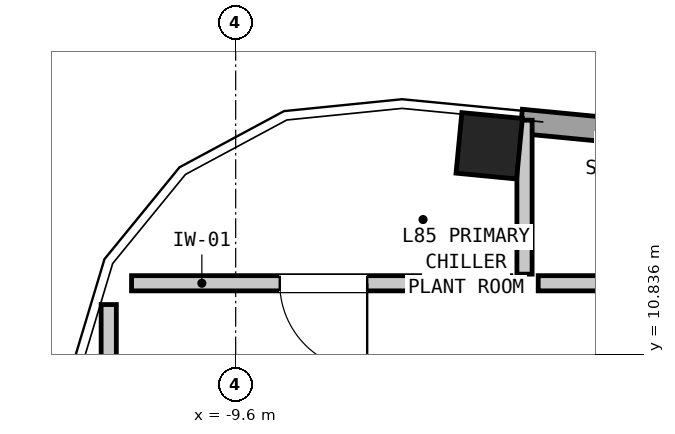
"""IFC4 building model, lengths in metres.
Left out: names, types, materials, properties, quantities, classifications, styles, units other than length and angle.
Written with IfcOpenShell. Run it as: python <this file> out.ifc"""

import sys

from ifc_helpers import new_model, si_unit, direction, frame, frame_2d, origin, origin_2d, place, context, subcontext, project, spatial, rectangle, extrude, element, fill, save


model = new_model("IFC4")
c1 = context("Model", 3, precision=1e-05, world=origin(), true_north=direction((0.0, 1.0)))
c2 = subcontext(c1, "Body", "Model", "MODEL_VIEW")
j1 = project(units=[si_unit("LENGTHUNIT", "METRE"), si_unit("PLANEANGLEUNIT", "RADIAN")], contexts=[c1])
p1 = place(None, origin())
s1 = spatial("IfcSite", under=j1, at=p1, CompositionType="ELEMENT")
p2 = place(p1, origin())
s2 = spatial("IfcBuilding", under=s1, at=p2, CompositionType="ELEMENT")
p3 = place(p2, frame((0.0, 0.0, 289.25)))
s3 = spatial("IfcBuildingStorey", under=s2, at=p3, CompositionType="ELEMENT", Elevation=289.25)
p4 = place(p3, frame((-6.264, 13.579, 0.0), z_axis=(0.0, 0.0, 1.0), x_axis=(0.995396198367, -0.09584575252, 0.0)))
e1 = element("IfcColumn", 1, at=p4, inside=s3, PredefinedType="COLUMN", context=c2, shape_type="SweptSolid", body=[
    extrude(rectangle(XDim=0.8, YDim=0.8, at=origin_2d()), origin(), (0.0, 0.0, 1.0), 3.6),
])
p5 = place(p3, frame((-5.844, 13.9, 0.0), z_axis=(0.0, 0.0, 1.0), x_axis=(0.995396489284, -0.095842731181, 0.0)))
e2 = element("IfcWall", 2, at=p5, inside=s3, PredefinedType="SOLIDWALL", context=c2, shape_type="SweptSolid", body=[
    extrude(rectangle(XDim=22.024, YDim=0.32, at=frame_2d((11.012, 0.0))), origin(), (0.0, 0.0, 1.0), 2.182),
])
p6 = place(p3, frame((-5.98, 11.77, 0.0), z_axis=(0.0, 0.0, 1.0), x_axis=(-1.0, 0.0, 0.0)))
e3 = element("IfcWall", 3, at=p6, inside=s3, PredefinedType="PARTITIONING", context=c2, shape_type="SweptSolid", body=[
    extrude(rectangle(XDim=4.99, YDim=0.2, at=frame_2d((2.495, 0.0))), origin(), (0.0, 0.0, 1.0), 3.32),
])
p7 = place(p6, frame((1.89, 0.0, 0.0)))
e4 = element("IfcOpeningElement", 4, at=p7, cuts=e3, PredefinedType="OPENING", context=c2, shape_type="SweptSolid", body=[
    extrude(rectangle(XDim=1.15, YDim=2.1, at=frame_2d((0.575, 1.05))), frame((0.0, 0.112, 0.0), z_axis=(0.0, -1.0, 0.0), x_axis=(1.0, 0.0, 0.0)), (0.0, 0.0, 1.0), 0.224),
])
p8 = place(p3, frame((-5.8, 11.89, 0.0), z_axis=(0.0, 0.0, 1.0), x_axis=(0.0, 1.0, 0.0)))
e5 = element("IfcWall", 5, at=p8, inside=s3, PredefinedType="PARTITIONING", context=c2, shape_type="SweptSolid", body=[
    extrude(rectangle(XDim=2.026, YDim=0.2, at=frame_2d((1.013, 0.0))), origin(), (0.0, 0.0, 1.0), 2.538),
])
p9 = place(p3, frame((-0.53, 11.77, 0.0), z_axis=(0.0, 0.0, 1.0), x_axis=(-1.0, 0.0, 0.0)))
e6 = element("IfcWall", 6, at=p9, inside=s3, PredefinedType="PARTITIONING", context=c2, shape_type="SweptSolid", body=[
    extrude(rectangle(XDim=5.09, YDim=0.2, at=frame_2d((2.545, 0.0))), origin(), (0.0, 0.0, 1.0), 3.32),
])
p10 = place(p9, frame((1.97, 0.0, 0.0)))
e7 = element("IfcOpeningElement", 7, at=p10, cuts=e6, PredefinedType="OPENING", context=c2, shape_type="SweptSolid", body=[
    extrude(rectangle(XDim=1.15, YDim=2.1, at=frame_2d((0.575, 1.05))), frame((0.0, 0.112, 0.0), z_axis=(0.0, -1.0, 0.0), x_axis=(1.0, 0.0, 0.0)), (0.0, 0.0, 1.0), 0.224),
])
p11 = place(p3, frame((-11.27, 11.49, 0.0), z_axis=(0.0, 0.0, 1.0), x_axis=(0.0, -1.0, 0.0)))
e8 = element("IfcWall", 8, at=p11, inside=s3, PredefinedType="PARTITIONING", context=c2, shape_type="SweptSolid", body=[
    extrude(rectangle(XDim=10.68, YDim=0.2, at=frame_2d((5.34, 0.0))), origin(), (0.0, 0.0, 1.0), 2.182),
])
p12 = place(p11, frame((4.765, 0.0, 0.0)))
e9 = element("IfcOpeningElement", 9, at=p12, cuts=e8, PredefinedType="OPENING", context=c2, shape_type="SweptSolid", body=[
    extrude(rectangle(XDim=1.15, YDim=2.1, at=frame_2d((0.575, 1.05))), frame((0.0, 0.112, 0.0), z_axis=(0.0, -1.0, 0.0), x_axis=(1.0, 0.0, 0.0)), (0.0, 0.0, 1.0), 0.224),
])
p13 = place(p7, origin())
e10 = element("IfcDoor", 10, at=p13, inside=s3, OperationType="SINGLE_SWING_LEFT", PredefinedType="DOOR", context=c2, shape_type="SweptSolid", body=[
    extrude(rectangle(XDim=1.15, YDim=2.1, at=frame_2d((0.575, 1.05))), frame((0.0, 0.025, 0.0), z_axis=(0.0, -1.0, 0.0), x_axis=(1.0, 0.0, 0.0)), (0.0, 0.0, 1.0), 0.05),
])
fill(e4, e10)
save(model, sys.argv[1])
